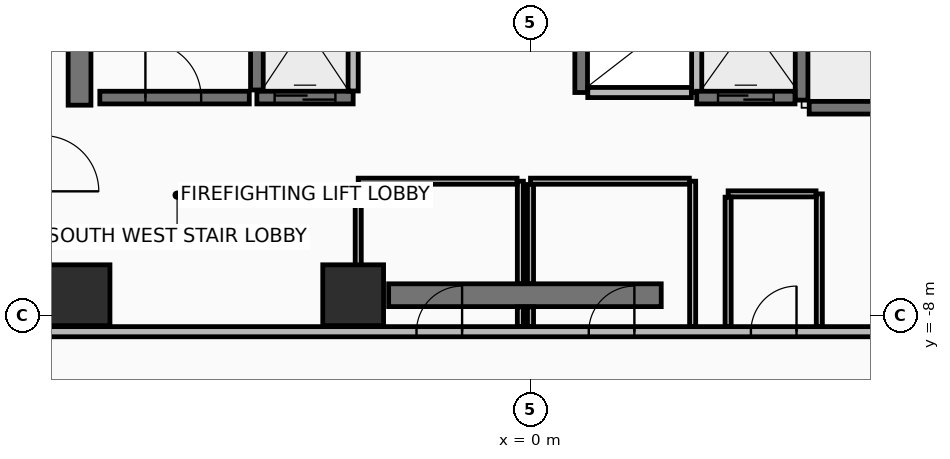
"""IFC4 building model, lengths in metres.
Left out: names, types, materials, properties, quantities, classifications, styles, units other than length and angle.
Written with IfcOpenShell. Run it as: python <this file> out.ifc"""

import sys

from ifc_helpers import new_model, si_unit, direction, frame, frame_2d, origin, origin_2d, place, context, subcontext, project, spatial, rectangle, extrude, element, fill, save


model = new_model("IFC4")
c1 = context("Model", 3, precision=1e-05, world=origin(), true_north=direction((0.0, 1.0)))
c2 = subcontext(c1, "Body", "Model", "MODEL_VIEW")
j1 = project(units=[si_unit("LENGTHUNIT", "METRE"), si_unit("PLANEANGLEUNIT", "RADIAN")], contexts=[c1])
p1 = place(None, origin())
s1 = spatial("IfcSite", under=j1, at=p1, CompositionType="ELEMENT")
p2 = place(p1, origin())
s2 = spatial("IfcBuilding", under=s1, at=p2, CompositionType="ELEMENT")
p3 = place(p2, frame((0.0, 0.0, 96.9)))
s3 = spatial("IfcBuildingStorey", under=s2, at=p3, CompositionType="ELEMENT", Elevation=96.9)
for number, where, z_axis, x_axis in (
    (1, (-8.9, -7.6, 0.0), (0.0, 0.0, 1.0), (1.0, 0.0, 0.0)),
    (2, (-3.5, -7.6, 0.0), (0.0, 0.0, 1.0), (1.0, 0.0, 0.0)),
):
    element("IfcColumn", number, at=place(p3, frame(where, z_axis=z_axis, x_axis=x_axis)), inside=s3, PredefinedType="COLUMN", context=c2, shape_type="SweptSolid", body=[
        extrude(rectangle(XDim=1.2, YDim=1.2, at=origin_2d()), origin(), (0.0, 0.0, 1.0), 3.6),
    ])
p4 = place(p3, frame((-2.8, -7.6, 0.0), z_axis=(0.0, 0.0, 1.0), x_axis=(1.0, 0.0, 0.0)))
e3 = element("IfcWall", 3, at=p4, inside=s3, PredefinedType="SHEAR", context=c2, shape_type="SweptSolid", body=[
    extrude(rectangle(XDim=5.38, YDim=0.45, at=frame_2d((2.69, 0.0))), origin(), (0.0, 0.0, 1.0), 3.41),
])
p5 = place(p3, frame((-8.9, -3.85, 0.0), z_axis=(0.0, 0.0, 1.0), x_axis=(0.0, 1.0, 0.0)))
e4 = element("IfcWall", 4, at=p5, inside=s3, PredefinedType="SHEAR", context=c2, shape_type="SweptSolid", body=[
    extrude(rectangle(XDim=10.7, YDim=0.45, at=frame_2d((5.35, 0.0))), origin(), (0.0, 0.0, 1.0), 3.41),
])
p6 = place(p3, frame((-9.62, -8.32, 0.0), z_axis=(0.0, 0.0, 1.0), x_axis=(1.0, 0.0, 0.0)))
e5 = element("IfcWall", 5, at=p6, inside=s3, PredefinedType="PARTITIONING", context=c2, shape_type="SweptSolid", body=[
    extrude(rectangle(XDim=19.24, YDim=0.2, at=frame_2d((9.62, 0.0))), origin(), (0.0, 0.0, 1.0), 2.805),
])
p7 = place(p6, frame((7.37, 0.0, 0.0)))
e6 = element("IfcOpeningElement", 6, at=p7, cuts=e5, PredefinedType="OPENING", context=c2, shape_type="SweptSolid", body=[
    extrude(rectangle(XDim=0.9, YDim=2.1, at=frame_2d((0.45, 1.05))), frame((0.0, 0.11, 0.0), z_axis=(0.0, -1.0, 0.0), x_axis=(1.0, 0.0, 0.0)), (0.0, 0.0, 1.0), 0.22),
])
p8 = place(p6, frame((10.77, 0.0, 0.0)))
e7 = element("IfcOpeningElement", 7, at=p8, cuts=e5, PredefinedType="OPENING", context=c2, shape_type="SweptSolid", body=[
    extrude(rectangle(XDim=0.9, YDim=2.1, at=frame_2d((0.45, 1.05))), frame((0.0, 0.11, 0.0), z_axis=(0.0, -1.0, 0.0), x_axis=(1.0, 0.0, 0.0)), (0.0, 0.0, 1.0), 0.22),
])
p9 = place(p6, frame((13.97, 0.0, 0.0)))
e8 = element("IfcOpeningElement", 8, at=p9, cuts=e5, PredefinedType="OPENING", context=c2, shape_type="SweptSolid", body=[
    extrude(rectangle(XDim=0.9, YDim=2.1, at=frame_2d((0.45, 1.05))), frame((0.0, 0.11, 0.0), z_axis=(0.0, -1.0, 0.0), x_axis=(1.0, 0.0, 0.0)), (0.0, 0.0, 1.0), 0.22),
])
p10 = place(p3, frame((-5.4, -3.55, 0.0), z_axis=(0.0, 0.0, 1.0), x_axis=(0.0, 1.0, 0.0)))
e9 = element("IfcWall", 9, at=p10, inside=s3, PredefinedType="SHEAR", context=c2, shape_type="SweptSolid", body=[
    extrude(rectangle(XDim=7.3, YDim=0.25, at=frame_2d((3.65, 0.0))), origin(), (0.0, 0.0, 1.0), 3.41),
])
p11 = place(p3, frame((-8.5, -3.7, 0.0), z_axis=(0.0, 0.0, 1.0), x_axis=(1.0, 0.0, 0.0)))
e10 = element("IfcWall", 10, at=p11, inside=s3, PredefinedType="SHEAR", context=c2, shape_type="SweptSolid", body=[
    extrude(rectangle(XDim=2.95, YDim=0.25, at=frame_2d((1.475, 0.0))), origin(), (0.0, 0.0, 1.0), 3.41),
])
p12 = place(p11, frame((0.9, 0.0, 0.0)))
e11 = element("IfcOpeningElement", 11, at=p12, cuts=e10, PredefinedType="OPENING", context=c2, shape_type="SweptSolid", body=[
    extrude(rectangle(XDim=1.1, YDim=2.15, at=frame_2d((0.55, 1.075))), frame((0.0, 0.135, 0.0), z_axis=(0.0, -1.0, 0.0), x_axis=(1.0, 0.0, 0.0)), (0.0, 0.0, 1.0), 0.27),
])
p13 = place(p3, frame((5.35, -3.75, 0.0), z_axis=(0.0, 0.0, 1.0), x_axis=(0.0, 1.0, 0.0)))
e12 = element("IfcWall", 12, at=p13, inside=s3, PredefinedType="SHEAR", context=c2, shape_type="SweptSolid", body=[
    extrude(rectangle(XDim=7.3, YDim=0.25, at=frame_2d((3.65, 0.0))), origin(), (0.0, 0.0, 1.0), 3.41),
])
p14 = place(p3, frame((5.5, -3.9, 0.0), z_axis=(0.0, 0.0, 1.0), x_axis=(1.0, 0.0, 0.0)))
e13 = element("IfcWall", 13, at=p14, inside=s3, PredefinedType="SHEAR", context=c2, shape_type="SweptSolid", body=[
    extrude(rectangle(XDim=3.0, YDim=0.25, at=frame_2d((1.5, 0.0))), origin(), (0.0, 0.0, 1.0), 3.41),
])
p15 = place(p3, frame((1.0, -3.6, 0.0), z_axis=(0.0, 0.0, 1.0), x_axis=(0.0, 1.0, 0.0)))
e14 = element("IfcWall", 14, at=p15, inside=s3, PredefinedType="SHEAR", context=c2, shape_type="SweptSolid", body=[
    extrude(rectangle(XDim=1.8, YDim=0.25, at=frame_2d((0.9, 0.0))), origin(), (0.0, 0.0, 1.0), 3.41),
])
p16 = place(p3, frame((3.28, -3.6, 0.0), z_axis=(0.0, 0.0, 1.0), x_axis=(0.0, 1.0, 0.0)))
e15 = element("IfcWall", 15, at=p16, inside=s3, PredefinedType="PARTITIONING", context=c2, shape_type="SweptSolid", body=[
    extrude(rectangle(XDim=1.8, YDim=0.2, at=frame_2d((0.9, 0.0))), origin(), (0.0, 0.0, 1.0), 3.41),
])
p17 = place(p3, frame((1.13, -3.6, 0.0), z_axis=(0.0, 0.0, 1.0), x_axis=(1.0, 0.0, 0.0)))
e16 = element("IfcWall", 16, at=p17, inside=s3, PredefinedType="PARTITIONING", context=c2, shape_type="SweptSolid", body=[
    extrude(rectangle(XDim=2.045, YDim=0.2, at=frame_2d((1.022, 0.0))), origin(), (0.0, 0.0, 1.0), 3.41),
])
p18 = place(p3, frame((-5.4, -3.7, 0.0), z_axis=(0.0, 0.0, 1.0), x_axis=(1.0, 0.0, 0.0)))
e17 = element("IfcWall", 17, at=p18, inside=s3, PredefinedType="SHEAR", context=c2, shape_type="SweptSolid", body=[
    extrude(rectangle(XDim=1.9, YDim=0.25, at=frame_2d((0.95, 0.0))), origin(), (0.0, 0.0, 1.0), 3.41),
])
p19 = place(p18, frame((0.35, 0.0, 0.0)))
e18 = element("IfcOpeningElement", 18, at=p19, cuts=e17, PredefinedType="OPENING", context=c2, shape_type="SweptSolid", body=[
    extrude(rectangle(XDim=1.2, YDim=2.2, at=frame_2d((0.6, 1.1))), frame((0.0, 0.135, 0.0), z_axis=(0.0, -1.0, 0.0), x_axis=(1.0, 0.0, 0.0)), (0.0, 0.0, 1.0), 0.27),
])
p20 = place(p3, frame((-3.5, -3.57, 0.0), z_axis=(0.0, 0.0, 1.0), x_axis=(0.0, 1.0, 0.0)))
e19 = element("IfcWall", 19, at=p20, inside=s3, PredefinedType="PARTITIONING", context=c2, shape_type="SweptSolid", body=[
    extrude(rectangle(XDim=2.615, YDim=0.2, at=frame_2d((1.308, 0.0))), origin(), (0.0, 0.0, 1.0), 3.41),
])
p21 = place(p3, frame((3.28, -3.7, 0.0), z_axis=(0.0, 0.0, 1.0), x_axis=(1.0, 0.0, 0.0)))
e20 = element("IfcWall", 20, at=p21, inside=s3, PredefinedType="SHEAR", context=c2, shape_type="SweptSolid", body=[
    extrude(rectangle(XDim=1.94, YDim=0.25, at=frame_2d((0.97, 0.0))), origin(), (0.0, 0.0, 1.0), 3.41),
])
p22 = place(p21, frame((0.42, 0.0, 0.0)))
e21 = element("IfcOpeningElement", 21, at=p22, cuts=e20, PredefinedType="OPENING", context=c2, shape_type="SweptSolid", body=[
    extrude(rectangle(XDim=1.1, YDim=2.2, at=frame_2d((0.55, 1.1))), frame((0.0, 0.135, 0.0), z_axis=(0.0, -1.0, 0.0), x_axis=(1.0, 0.0, 0.0)), (0.0, 0.0, 1.0), 0.27),
])
p23 = place(p3, frame((-0.2, -8.215, 0.0), z_axis=(0.0, 0.0, 1.0), x_axis=(0.0, 1.0, 0.0)))
e22 = element("IfcWall", 22, at=p23, inside=s3, PredefinedType="PARTITIONING", context=c2, shape_type="SweptSolid", body=[
    extrude(rectangle(XDim=0.385, YDim=0.12, at=frame_2d((0.192, 0.0))), origin(), (0.0, 0.0, 1.0), 2.605),
])
p24 = place(p3, frame((-0.2, -7.37, 0.0), z_axis=(0.0, 0.0, 1.0), x_axis=(0.0, 1.0, 0.0)))
e23 = element("IfcWall", 23, at=p24, inside=s3, PredefinedType="PARTITIONING", context=c2, shape_type="SweptSolid", body=[
    extrude(rectangle(XDim=2.02, YDim=0.12, at=frame_2d((1.01, 0.0))), origin(), (0.0, 0.0, 1.0), 2.605),
])
p25 = place(p3, frame((-0.265, -5.35, 0.0), z_axis=(0.0, 0.0, 1.0), x_axis=(-1.0, 0.0, 0.0)))
e24 = element("IfcWall", 24, at=p25, inside=s3, PredefinedType="PARTITIONING", context=c2, shape_type="SweptSolid", body=[
    extrude(rectangle(XDim=3.135, YDim=0.12, at=frame_2d((1.567, 0.0))), origin(), (0.0, 0.0, 1.0), 2.605),
])
p26 = place(p3, frame((-3.4, -5.415, 0.0), z_axis=(0.0, 0.0, 1.0), x_axis=(0.0, -1.0, 0.0)))
e25 = element("IfcWall", 25, at=p26, inside=s3, PredefinedType="PARTITIONING", context=c2, shape_type="SweptSolid", body=[
    extrude(rectangle(XDim=2.8, YDim=0.12, at=frame_2d((1.4, 0.0))), origin(), (0.0, 0.0, 1.0), 2.605),
])
p27 = place(p3, frame((3.2, -8.215, 0.0), z_axis=(0.0, 0.0, 1.0), x_axis=(0.0, 1.0, 0.0)))
e26 = element("IfcWall", 26, at=p27, inside=s3, PredefinedType="PARTITIONING", context=c2, shape_type="SweptSolid", body=[
    extrude(rectangle(XDim=2.865, YDim=0.12, at=frame_2d((1.433, 0.0))), origin(), (0.0, 0.0, 1.0), 2.605),
])
p28 = place(p3, frame((3.135, -5.35, 0.0), z_axis=(0.0, 0.0, 1.0), x_axis=(-1.0, 0.0, 0.0)))
e27 = element("IfcWall", 27, at=p28, inside=s3, PredefinedType="PARTITIONING", context=c2, shape_type="SweptSolid", body=[
    extrude(rectangle(XDim=3.135, YDim=0.12, at=frame_2d((1.567, 0.0))), origin(), (0.0, 0.0, 1.0), 3.41),
])
p29 = place(p3, frame((0.0, -5.415, 0.0), z_axis=(0.0, 0.0, 1.0), x_axis=(0.0, -1.0, 0.0)))
e28 = element("IfcWall", 28, at=p29, inside=s3, PredefinedType="PARTITIONING", context=c2, shape_type="SweptSolid", body=[
    extrude(rectangle(XDim=1.955, YDim=0.12, at=frame_2d((0.978, 0.0))), origin(), (0.0, 0.0, 1.0), 2.605),
])
p30 = place(p3, frame((0.0, -7.83, 0.0), z_axis=(0.0, 0.0, 1.0), x_axis=(0.0, -1.0, 0.0)))
e29 = element("IfcWall", 29, at=p30, inside=s3, PredefinedType="PARTITIONING", context=c2, shape_type="SweptSolid", body=[
    extrude(rectangle(XDim=0.385, YDim=0.12, at=frame_2d((0.192, 0.0))), origin(), (0.0, 0.0, 1.0), 2.605),
])
p31 = place(p3, frame((5.7, -8.215, 0.0), z_axis=(0.0, 0.0, 1.0), x_axis=(0.0, 1.0, 0.0)))
e30 = element("IfcWall", 30, at=p31, inside=s3, PredefinedType="PARTITIONING", context=c2, shape_type="SweptSolid", body=[
    extrude(rectangle(XDim=2.615, YDim=0.12, at=frame_2d((1.308, 0.0))), origin(), (0.0, 0.0, 1.0), 2.605),
])
p32 = place(p3, frame((5.635, -5.6, 0.0), z_axis=(0.0, 0.0, 1.0), x_axis=(-1.0, 0.0, 0.0)))
e31 = element("IfcWall", 31, at=p32, inside=s3, PredefinedType="PARTITIONING", context=c2, shape_type="SweptSolid", body=[
    extrude(rectangle(XDim=1.735, YDim=0.12, at=frame_2d((0.868, 0.0))), origin(), (0.0, 0.0, 1.0), 3.41),
])
p33 = place(p3, frame((3.9, -5.665, 0.0), z_axis=(0.0, 0.0, 1.0), x_axis=(0.0, -1.0, 0.0)))
e32 = element("IfcWall", 32, at=p33, inside=s3, PredefinedType="PARTITIONING", context=c2, shape_type="SweptSolid", body=[
    extrude(rectangle(XDim=2.55, YDim=0.12, at=frame_2d((1.275, 0.0))), origin(), (0.0, 0.0, 1.0), 2.605),
])
p34 = place(p12, origin())
e33 = element("IfcDoor", 33, at=p34, inside=s3, OperationType="SINGLE_SWING_LEFT", PredefinedType="DOOR", context=c2, shape_type="SweptSolid", body=[
    extrude(rectangle(XDim=1.1, YDim=2.15, at=frame_2d((0.55, 1.075))), frame((0.0, 0.025, 0.0), z_axis=(0.0, -1.0, 0.0), x_axis=(1.0, 0.0, 0.0)), (0.0, 0.0, 1.0), 0.05),
])
fill(e11, e33)
p35 = place(p19, origin())
e34 = element("IfcDoor", 34, at=p35, inside=s3, OperationType="SLIDING_TO_RIGHT", PredefinedType="DOOR", context=c2, shape_type="SweptSolid", body=[
    extrude(rectangle(XDim=1.2, YDim=2.2, at=frame_2d((0.6, 1.1))), frame((0.0, 0.025, 0.0), z_axis=(0.0, -1.0, 0.0), x_axis=(1.0, 0.0, 0.0)), (0.0, 0.0, 1.0), 0.05),
])
fill(e18, e34)
p36 = place(p22, origin())
e35 = element("IfcDoor", 35, at=p36, inside=s3, OperationType="SLIDING_TO_LEFT", PredefinedType="DOOR", context=c2, shape_type="SweptSolid", body=[
    extrude(rectangle(XDim=1.1, YDim=2.2, at=frame_2d((0.55, 1.1))), frame((0.0, 0.025, 0.0), z_axis=(0.0, -1.0, 0.0), x_axis=(1.0, 0.0, 0.0)), (0.0, 0.0, 1.0), 0.05),
])
fill(e21, e35)
p37 = place(p7, frame((0.9, 0.0, 0.0), z_axis=(0.0, 0.0, 1.0), x_axis=(-1.0, 0.0, 0.0)))
e36 = element("IfcDoor", 36, at=p37, inside=s3, OperationType="SINGLE_SWING_LEFT", PredefinedType="DOOR", context=c2, shape_type="SweptSolid", body=[
    extrude(rectangle(XDim=0.9, YDim=2.1, at=frame_2d((0.45, 1.05))), frame((0.0, 0.025, 0.0), z_axis=(0.0, -1.0, 0.0), x_axis=(1.0, 0.0, 0.0)), (0.0, 0.0, 1.0), 0.05),
])
fill(e6, e36)
p38 = place(p8, frame((0.9, 0.0, 0.0), z_axis=(0.0, 0.0, 1.0), x_axis=(-1.0, 0.0, 0.0)))
e37 = element("IfcDoor", 37, at=p38, inside=s3, OperationType="SINGLE_SWING_LEFT", PredefinedType="DOOR", context=c2, shape_type="SweptSolid", body=[
    extrude(rectangle(XDim=0.9, YDim=2.1, at=frame_2d((0.45, 1.05))), frame((0.0, 0.025, 0.0), z_axis=(0.0, -1.0, 0.0), x_axis=(1.0, 0.0, 0.0)), (0.0, 0.0, 1.0), 0.05),
])
fill(e7, e37)
p39 = place(p9, frame((0.9, 0.0, 0.0), z_axis=(0.0, 0.0, 1.0), x_axis=(-1.0, 0.0, 0.0)))
e38 = element("IfcDoor", 38, at=p39, inside=s3, OperationType="SINGLE_SWING_LEFT", PredefinedType="DOOR", context=c2, shape_type="SweptSolid", body=[
    extrude(rectangle(XDim=0.9, YDim=2.1, at=frame_2d((0.45, 1.05))), frame((0.0, 0.025, 0.0), z_axis=(0.0, -1.0, 0.0), x_axis=(1.0, 0.0, 0.0)), (0.0, 0.0, 1.0), 0.05),
])
fill(e8, e38)
save(model, sys.argv[1])
